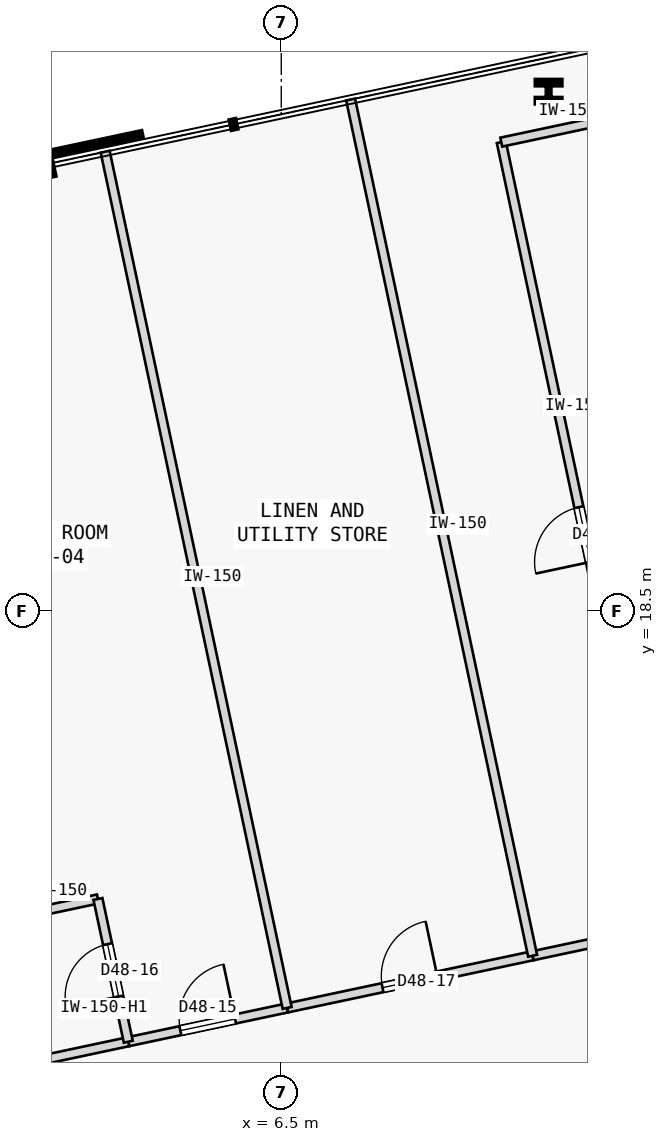
"""IFC4 building model, lengths in metres.
Left out: names, types, materials, properties, quantities, classifications, styles, units other than length and angle.
Written with IfcOpenShell. Run it as: python <this file> out.ifc"""

import sys

from ifc_helpers import new_model, si_unit, direction, frame, frame_2d, origin, origin_2d, place, context, subcontext, project, spatial, rectangle, i_section, extrude, element, fill, save


model = new_model("IFC4")
c1 = context("Model", 3, precision=1e-05, world=origin(), true_north=direction((0.0, 1.0)))
c2 = subcontext(c1, "Body", "Model", "MODEL_VIEW")
j1 = project(units=[si_unit("LENGTHUNIT", "METRE"), si_unit("PLANEANGLEUNIT", "RADIAN")], contexts=[c1])
p1 = place(None, origin())
s1 = spatial("IfcSite", under=j1, at=p1, CompositionType="ELEMENT")
p2 = place(p1, origin())
s2 = spatial("IfcBuilding", under=s1, at=p2, CompositionType="ELEMENT")
p3 = place(p2, frame((0.0, 0.0, 185.4)))
s3 = spatial("IfcBuildingStorey", under=s2, at=p3, CompositionType="ELEMENT", Elevation=185.4)
p4 = place(p3, frame((10.896, 27.044, 0.0), z_axis=(0.0, 0.0, 1.0), x_axis=(1.0, 0.0, 0.0)))
e1 = element("IfcColumn", 1, at=p4, inside=s3, PredefinedType="COLUMN", context=c2, shape_type="SweptSolid", body=[
    extrude(i_section(OverallWidth=0.409, OverallDepth=0.374, WebThickness=0.048, FlangeThickness=0.077, FilletRadius=0.015, at=origin_2d()), origin(), (0.0, 0.0, 1.0), 3.4),
])
p5 = place(p3, frame((3.984, 11.421, 0.0), z_axis=(0.0, 0.0, 1.0), x_axis=(0.978139565144, 0.207949491702, 0.0)))
e2 = element("IfcWall", 2, at=p5, inside=s3, PredefinedType="PARTITIONING", context=c2, shape_type="SweptSolid", body=[
    extrude(rectangle(XDim=2.671, YDim=0.15, at=frame_2d((1.335, 0.0))), origin(), (0.0, 0.0, 1.0), 3.175),
])
p6 = place(p5, frame((0.875, 0.0, 0.0)))
e3 = element("IfcOpeningElement", 3, at=p6, cuts=e2, PredefinedType="OPENING", context=c2, shape_type="SweptSolid", body=[
    extrude(rectangle(XDim=0.92, YDim=2.15, at=frame_2d((0.46, 1.075))), frame((0.0, 0.085, 0.0), z_axis=(0.0, -1.0, 0.0), x_axis=(1.0, 0.0, 0.0)), (0.0, 0.0, 1.0), 0.17),
])
p7 = place(p3, frame((2.223, 11.046, 0.0), z_axis=(0.0, 0.0, 1.0), x_axis=(0.978146440129, 0.207917150959, 0.0)))
e4 = element("IfcWall", 4, at=p7, inside=s3, PredefinedType="PARTITIONING", context=c2, shape_type="SweptSolid", body=[
    extrude(rectangle(XDim=1.8, YDim=0.15, at=frame_2d((0.9, 0.0))), origin(), (0.0, 0.0, 1.0), 3.175),
])
p8 = place(p3, frame((6.597, 11.976, 0.0), z_axis=(0.0, 0.0, 1.0), x_axis=(0.978155092113, 0.207876443525, 0.0)))
e5 = element("IfcWall", 5, at=p8, inside=s3, PredefinedType="PARTITIONING", context=c2, shape_type="SweptSolid", body=[
    extrude(rectangle(XDim=4.127, YDim=0.15, at=frame_2d((2.063, 0.0))), origin(), (0.0, 0.0, 1.0), 3.175),
])
p9 = place(p8, frame((1.604, 0.0, 0.0)))
e6 = element("IfcOpeningElement", 6, at=p9, cuts=e5, PredefinedType="OPENING", context=c2, shape_type="SweptSolid", body=[
    extrude(rectangle(XDim=0.92, YDim=2.15, at=frame_2d((0.46, 1.075))), frame((0.0, 0.085, 0.0), z_axis=(0.0, -1.0, 0.0), x_axis=(1.0, 0.0, 0.0)), (0.0, 0.0, 1.0), 0.17),
])
p10 = place(p3, frame((10.634, 12.834, 0.0), z_axis=(0.0, 0.0, 1.0), x_axis=(0.978147682212, 0.207911307493, 0.0)))
e7 = element("IfcWall", 7, at=p10, inside=s3, PredefinedType="PARTITIONING", context=c2, shape_type="SweptSolid", body=[
    extrude(rectangle(XDim=2.278, YDim=0.15, at=frame_2d((1.139, 0.0))), origin(), (0.0, 0.0, 1.0), 3.175),
])
p11 = place(p3, frame((12.862, 13.308, 0.0), z_axis=(0.0, 0.0, 1.0), x_axis=(-0.207911421929, 0.978147657888, 0.0)))
e8 = element("IfcWall", 8, at=p11, inside=s3, PredefinedType="PARTITIONING", context=c2, shape_type="SweptSolid", body=[
    extrude(rectangle(XDim=13.195, YDim=0.15, at=frame_2d((6.598, 0.0))), origin(), (0.0, 0.0, 1.0), 3.175),
])
p12 = place(p11, frame((6.137, 0.0, 0.0)))
e9 = element("IfcOpeningElement", 9, at=p12, cuts=e8, PredefinedType="OPENING", context=c2, shape_type="SweptSolid", body=[
    extrude(rectangle(XDim=0.92, YDim=2.15, at=frame_2d((0.46, 1.075))), frame((0.0, 0.085, 0.0), z_axis=(0.0, -1.0, 0.0), x_axis=(1.0, 0.0, 0.0)), (0.0, 0.0, 1.0), 0.17),
])
p13 = place(p3, frame((10.118, 26.214, 0.0), z_axis=(0.0, 0.0, 1.0), x_axis=(0.978133353907, 0.20797870558, 0.0)))
e10 = element("IfcWall", 10, at=p13, inside=s3, PredefinedType="PARTITIONING", context=c2, shape_type="SweptSolid", body=[
    extrude(rectangle(XDim=1.85, YDim=0.15, at=frame_2d((0.925, 0.0))), origin(), (0.0, 0.0, 1.0), 3.175),
])
p14 = place(p3, frame((1.725, 13.394, 0.0), z_axis=(0.0, 0.0, 1.0), x_axis=(0.978140575842, 0.207944737591, 0.0)))
e11 = element("IfcWall", 11, at=p14, inside=s3, PredefinedType="PARTITIONING", context=c2, shape_type="SweptSolid", body=[
    extrude(rectangle(XDim=1.8, YDim=0.15, at=frame_2d((0.9, 0.0))), origin(), (0.0, 0.0, 1.0), 3.175),
])
p15 = place(p3, frame((3.984, 11.421, 0.0), z_axis=(0.0, 0.0, 1.0), x_axis=(-0.207917150959, 0.978146440129, 0.0)))
e12 = element("IfcWall", 12, at=p15, inside=s3, PredefinedType="PARTITIONING", context=c2, shape_type="SweptSolid", body=[
    extrude(rectangle(XDim=2.4, YDim=0.15, at=frame_2d((1.2, 0.0))), origin(), (0.0, 0.0, 1.0), 2.725),
])
p16 = place(p15, frame((0.76, 0.0, 0.0)))
e13 = element("IfcOpeningElement", 13, at=p16, cuts=e12, PredefinedType="OPENING", context=c2, shape_type="SweptSolid", body=[
    extrude(rectangle(XDim=0.88, YDim=2.15, at=frame_2d((0.44, 1.075))), frame((0.0, 0.085, 0.0), z_axis=(0.0, -1.0, 0.0), x_axis=(1.0, 0.0, 0.0)), (0.0, 0.0, 1.0), 0.17),
])
p17 = place(p3, frame((6.597, 11.976, 0.0), z_axis=(0.0, 0.0, 1.0), x_axis=(-0.207899121568, 0.978150272326, 0.0)))
e14 = element("IfcWall", 14, at=p17, inside=s3, PredefinedType="PARTITIONING", context=c2, shape_type="SweptSolid", body=[
    extrude(rectangle(XDim=14.395, YDim=0.15, at=frame_2d((7.197, 0.0))), origin(), (0.0, 0.0, 1.0), 3.175),
])
p18 = place(p3, frame((10.634, 12.834, 0.0), z_axis=(0.0, 0.0, 1.0), x_axis=(-0.207911899531, 0.97814755637, 0.0)))
e15 = element("IfcWall", 15, at=p18, inside=s3, PredefinedType="PARTITIONING", context=c2, shape_type="SweptSolid", body=[
    extrude(rectangle(XDim=14.395, YDim=0.15, at=frame_2d((7.198, 0.0))), origin(), (0.0, 0.0, 1.0), 3.175),
])
p19 = place(p6, origin())
e16 = element("IfcDoor", 16, at=p19, inside=s3, OperationType="SINGLE_SWING_RIGHT", PredefinedType="DOOR", context=c2, shape_type="SweptSolid", body=[
    extrude(rectangle(XDim=0.92, YDim=2.15, at=frame_2d((0.46, 1.075))), frame((0.0, 0.025, 0.0), z_axis=(0.0, -1.0, 0.0), x_axis=(1.0, 0.0, 0.0)), (0.0, 0.0, 1.0), 0.05),
])
fill(e3, e16)
p20 = place(p16, origin())
e17 = element("IfcDoor", 17, at=p20, inside=s3, OperationType="SINGLE_SWING_LEFT", PredefinedType="DOOR", context=c2, shape_type="SweptSolid", body=[
    extrude(rectangle(XDim=0.88, YDim=2.15, at=frame_2d((0.44, 1.075))), frame((0.0, 0.025, 0.0), z_axis=(0.0, -1.0, 0.0), x_axis=(1.0, 0.0, 0.0)), (0.0, 0.0, 1.0), 0.05),
])
fill(e13, e17)
p21 = place(p9, origin())
e18 = element("IfcDoor", 18, at=p21, inside=s3, OperationType="SINGLE_SWING_RIGHT", PredefinedType="DOOR", context=c2, shape_type="SweptSolid", body=[
    extrude(rectangle(XDim=0.92, YDim=2.15, at=frame_2d((0.46, 1.075))), frame((0.0, 0.025, 0.0), z_axis=(0.0, -1.0, 0.0), x_axis=(1.0, 0.0, 0.0)), (0.0, 0.0, 1.0), 0.05),
])
fill(e6, e18)
p22 = place(p12, origin())
e19 = element("IfcDoor", 19, at=p22, inside=s3, OperationType="SINGLE_SWING_LEFT", PredefinedType="DOOR", context=c2, shape_type="SweptSolid", body=[
    extrude(rectangle(XDim=0.92, YDim=2.15, at=frame_2d((0.46, 1.075))), frame((0.0, 0.025, 0.0), z_axis=(0.0, -1.0, 0.0), x_axis=(1.0, 0.0, 0.0)), (0.0, 0.0, 1.0), 0.05),
])
fill(e9, e19)
save(model, sys.argv[1])
